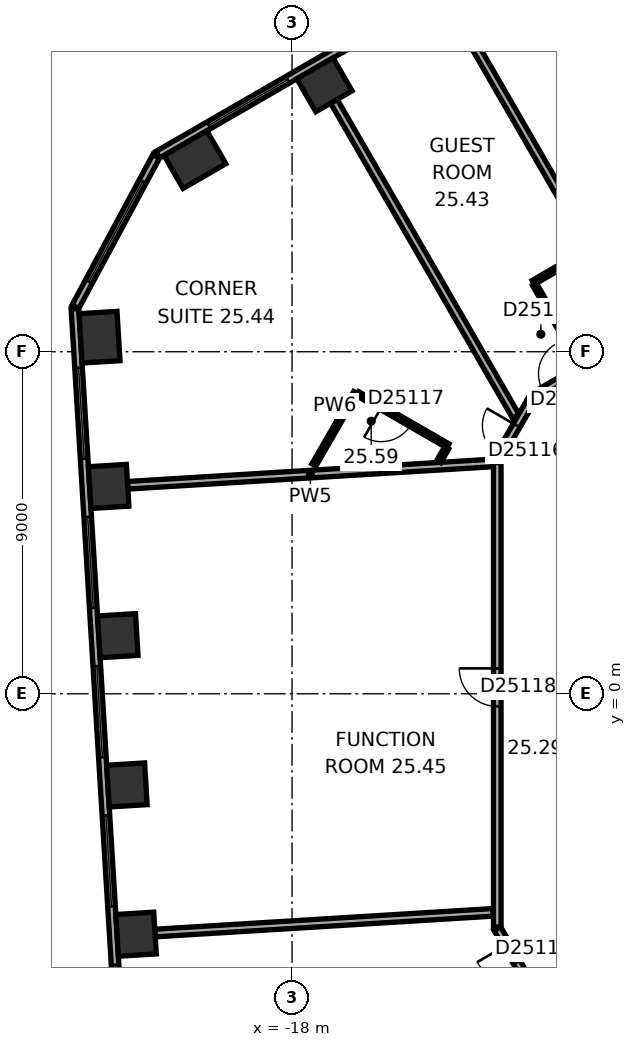
"""IFC4 building model, lengths in metres.
Left out: names, types, materials, properties, quantities, classifications, styles, units other than length and angle.
Written with IfcOpenShell. Run it as: python <this file> out.ifc"""

import sys

from ifc_helpers import new_model, si_unit, direction, frame, frame_2d, origin, origin_2d, place, context, subcontext, project, spatial, rectangle, extrude, element, fill, save


model = new_model("IFC4")
c1 = context("Model", 3, precision=1e-05, world=origin(), true_north=direction((0.0, 1.0)))
c2 = subcontext(c1, "Body", "Model", "MODEL_VIEW")
j1 = project(units=[si_unit("LENGTHUNIT", "METRE"), si_unit("PLANEANGLEUNIT", "RADIAN")], contexts=[c1])
p1 = place(None, origin())
s1 = spatial("IfcSite", under=j1, at=p1, CompositionType="ELEMENT")
p2 = place(p1, origin())
s2 = spatial("IfcBuilding", under=s1, at=p2, CompositionType="ELEMENT")
p3 = place(p2, frame((0.0, 0.0, 106.7)))
s3 = spatial("IfcBuildingStorey", under=s2, at=p3, CompositionType="ELEMENT", Elevation=106.7)
p4 = place(p3, frame((-17.148, 16.023, 0.0), z_axis=(0.0, 0.0, 1.0), x_axis=(-0.866025403784, -0.5, 0.0)))
e1 = element("IfcColumn", 1, at=p4, inside=s3, PredefinedType="COLUMN", context=c2, shape_type="SweptSolid", body=[
    extrude(rectangle(XDim=1.1, YDim=1.0, at=origin_2d()), origin(), (0.0, 0.0, 1.0), 3.3),
])
for number, where, z_axis, x_axis in (
    (2, (-20.555, 14.055, 0.0), (0.0, 0.0, 1.0), (-0.866, -0.5, 0.0)),
    (3, (-23.066, 9.383, 0.0), (0.0, 0.0, 1.0), (0.061, -0.998, 0.0)),
):
    element("IfcColumn", number, at=place(p3, frame(where, z_axis=z_axis, x_axis=x_axis)), inside=s3, PredefinedType="COLUMN", context=c2, shape_type="SweptSolid", body=[
        extrude(rectangle(XDim=1.3, YDim=1.0, at=origin_2d()), origin(), (0.0, 0.0, 1.0), 3.3),
    ])
for number, where, z_axis, x_axis in (
    (4, (-22.826, 5.456, 0.0), (0.0, 0.0, 1.0), (0.061, -0.998, 0.0)),
    (5, (-22.585, 1.529, 0.0), (0.0, 0.0, 1.0), (0.061, -0.998, 0.0)),
    (6, (-22.345, -2.399, 0.0), (0.0, 0.0, 1.0), (0.061, -0.998, 0.0)),
    (7, (-22.105, -6.326, 0.0), (0.0, 0.0, 1.0), (0.061, -0.998, 0.0)),
):
    element("IfcColumn", number, at=place(p3, frame(where, z_axis=z_axis, x_axis=x_axis)), inside=s3, PredefinedType="COLUMN", context=c2, shape_type="SweptSolid", body=[
        extrude(rectangle(XDim=1.1, YDim=1.0, at=origin_2d()), origin(), (0.0, 0.0, 1.0), 3.3),
    ])
p5 = place(p3, frame((-3.136, 24.805, 0.0), z_axis=(0.0, 0.0, 1.0), x_axis=(-0.866028291626, -0.499994998079, 0.0)))
e8 = element("IfcWall", 8, at=p5, inside=s3, PredefinedType="STANDARD", context=c2, shape_type="SweptSolid", body=[
    extrude(rectangle(XDim=21.246, YDim=0.2, at=frame_2d((10.623, 0.0))), origin(), (0.0, 0.0, 1.0), 3.3),
])
p6 = place(p5, frame((1.555, 0.0, 0.8)))
e9 = element("IfcOpeningElement", 9, at=p6, cuts=e8, PredefinedType="OPENING", context=c2, shape_type="SweptSolid", body=[
    extrude(rectangle(XDim=2.4, YDim=1.7, at=frame_2d((1.2, 0.85))), frame((0.0, 0.11, 0.0), z_axis=(0.0, -1.0, 0.0), x_axis=(1.0, 0.0, 0.0)), (0.0, 0.0, 1.0), 0.22),
])
p7 = place(p5, frame((5.489, 0.0, 0.8)))
e10 = element("IfcOpeningElement", 10, at=p7, cuts=e8, PredefinedType="OPENING", context=c2, shape_type="SweptSolid", body=[
    extrude(rectangle(XDim=2.4, YDim=1.7, at=frame_2d((1.2, 0.85))), frame((0.0, 0.11, 0.0), z_axis=(0.0, -1.0, 0.0), x_axis=(1.0, 0.0, 0.0)), (0.0, 0.0, 1.0), 0.22),
])
p8 = place(p5, frame((9.424, 0.0, 0.8)))
e11 = element("IfcOpeningElement", 11, at=p8, cuts=e8, PredefinedType="OPENING", context=c2, shape_type="SweptSolid", body=[
    extrude(rectangle(XDim=2.4, YDim=1.7, at=frame_2d((1.2, 0.85))), frame((0.0, 0.11, 0.0), z_axis=(0.0, -1.0, 0.0), x_axis=(1.0, 0.0, 0.0)), (0.0, 0.0, 1.0), 0.22),
])
p9 = place(p5, frame((13.358, 0.0, 0.8)))
e12 = element("IfcOpeningElement", 12, at=p9, cuts=e8, PredefinedType="OPENING", context=c2, shape_type="SweptSolid", body=[
    extrude(rectangle(XDim=2.4, YDim=1.7, at=frame_2d((1.2, 0.85))), frame((0.0, 0.11, 0.0), z_axis=(0.0, -1.0, 0.0), x_axis=(1.0, 0.0, 0.0)), (0.0, 0.0, 1.0), 0.22),
])
p10 = place(p5, frame((17.293, 0.0, 0.8)))
e13 = element("IfcOpeningElement", 13, at=p10, cuts=e8, PredefinedType="OPENING", context=c2, shape_type="SweptSolid", body=[
    extrude(rectangle(XDim=2.4, YDim=1.7, at=frame_2d((1.2, 0.85))), frame((0.0, 0.11, 0.0), z_axis=(0.0, -1.0, 0.0), x_axis=(1.0, 0.0, 0.0)), (0.0, 0.0, 1.0), 0.22),
])
p11 = place(p3, frame((-21.574, 14.143, 0.0), z_axis=(0.0, 0.0, 1.0), x_axis=(-0.473292949472, -0.880905093628, 0.0)))
e14 = element("IfcWall", 14, at=p11, inside=s3, PredefinedType="STANDARD", context=c2, shape_type="SweptSolid", body=[
    extrude(rectangle(XDim=4.494, YDim=0.2, at=frame_2d((2.247, 0.0))), origin(), (0.0, 0.0, 1.0), 3.3),
])
p12 = place(p11, frame((0.747, 0.0, 0.8)))
e15 = element("IfcOpeningElement", 15, at=p12, cuts=e14, PredefinedType="OPENING", context=c2, shape_type="SweptSolid", body=[
    extrude(rectangle(XDim=3.0, YDim=1.7, at=frame_2d((1.5, 0.85))), frame((0.0, 0.11, 0.0), z_axis=(0.0, -1.0, 0.0), x_axis=(1.0, 0.0, 0.0)), (0.0, 0.0, 1.0), 0.22),
])
p13 = place(p3, frame((-23.713, 10.131, 0.0), z_axis=(0.0, 0.0, 1.0), x_axis=(0.061040439785, -0.998135293791, 0.0)))
e16 = element("IfcWall", 16, at=p13, inside=s3, PredefinedType="STANDARD", context=c2, shape_type="SweptSolid", body=[
    extrude(rectangle(XDim=21.246, YDim=0.2, at=frame_2d((10.623, 0.0))), origin(), (0.0, 0.0, 1.0), 3.3),
])
p14 = place(p13, frame((1.553, 0.0, 0.8)))
e17 = element("IfcOpeningElement", 17, at=p14, cuts=e16, PredefinedType="OPENING", context=c2, shape_type="SweptSolid", body=[
    extrude(rectangle(XDim=2.4, YDim=1.7, at=frame_2d((1.2, 0.85))), frame((0.0, 0.11, 0.0), z_axis=(0.0, -1.0, 0.0), x_axis=(1.0, 0.0, 0.0)), (0.0, 0.0, 1.0), 0.22),
])
p15 = place(p13, frame((5.488, 0.0, 0.8)))
e18 = element("IfcOpeningElement", 18, at=p15, cuts=e16, PredefinedType="OPENING", context=c2, shape_type="SweptSolid", body=[
    extrude(rectangle(XDim=2.4, YDim=1.7, at=frame_2d((1.2, 0.85))), frame((0.0, 0.11, 0.0), z_axis=(0.0, -1.0, 0.0), x_axis=(1.0, 0.0, 0.0)), (0.0, 0.0, 1.0), 0.22),
])
p16 = place(p13, frame((9.422, 0.0, 0.8)))
e19 = element("IfcOpeningElement", 19, at=p16, cuts=e16, PredefinedType="OPENING", context=c2, shape_type="SweptSolid", body=[
    extrude(rectangle(XDim=2.4, YDim=1.7, at=frame_2d((1.2, 0.85))), frame((0.0, 0.11, 0.0), z_axis=(0.0, -1.0, 0.0), x_axis=(1.0, 0.0, 0.0)), (0.0, 0.0, 1.0), 0.22),
])
p17 = place(p13, frame((13.357, 0.0, 0.8)))
e20 = element("IfcOpeningElement", 20, at=p17, cuts=e16, PredefinedType="OPENING", context=c2, shape_type="SweptSolid", body=[
    extrude(rectangle(XDim=2.4, YDim=1.7, at=frame_2d((1.2, 0.85))), frame((0.0, 0.11, 0.0), z_axis=(0.0, -1.0, 0.0), x_axis=(1.0, 0.0, 0.0)), (0.0, 0.0, 1.0), 0.22),
])
p18 = place(p13, frame((17.292, 0.0, 0.8)))
e21 = element("IfcOpeningElement", 21, at=p18, cuts=e16, PredefinedType="OPENING", context=c2, shape_type="SweptSolid", body=[
    extrude(rectangle(XDim=2.4, YDim=1.7, at=frame_2d((1.2, 0.85))), frame((0.0, 0.11, 0.0), z_axis=(0.0, -1.0, 0.0), x_axis=(1.0, 0.0, 0.0)), (0.0, 0.0, 1.0), 0.22),
])
p19 = place(p3, frame((-22.327, 5.486, 0.0), z_axis=(0.0, 0.0, 1.0), x_axis=(0.998135194863, 0.061042057435, 0.0)))
e22 = element("IfcWall", 22, at=p19, inside=s3, PredefinedType="PARTITIONING", context=c2, shape_type="SweptSolid", body=[
    extrude(rectangle(XDim=9.635, YDim=0.2, at=frame_2d((4.817, 0.0))), origin(), (0.0, 0.0, 1.0), 3.05),
])
p20 = place(p3, frame((-21.606, -6.295, 0.0), z_axis=(0.0, 0.0, 1.0), x_axis=(0.998134305525, 0.061056597794, 0.0)))
e23 = element("IfcWall", 23, at=p20, inside=s3, PredefinedType="PARTITIONING", context=c2, shape_type="SweptSolid", body=[
    extrude(rectangle(XDim=8.913, YDim=0.2, at=frame_2d((4.457, 0.0))), origin(), (0.0, 0.0, 1.0), 2.6),
])
p21 = place(p3, frame((-17.426, 6.019, 0.0), z_axis=(0.0, 0.0, 1.0), x_axis=(0.50002983664, 0.866008176907, 0.0)))
e24 = element("IfcWall", 24, at=p21, inside=s3, PredefinedType="PARTITIONING", context=c2, shape_type="SweptSolid", body=[
    extrude(rectangle(XDim=2.2, YDim=0.12, at=frame_2d((1.1, 0.0))), origin(), (0.0, 0.0, 1.0), 3.05),
])
p22 = place(p3, frame((-16.898, 15.59, 0.0), z_axis=(0.0, 0.0, 1.0), x_axis=(0.500023458698, -0.866011859475, 0.0)))
e25 = element("IfcWall", 25, at=p22, inside=s3, PredefinedType="PARTITIONING", context=c2, shape_type="SweptSolid", body=[
    extrude(rectangle(XDim=9.572, YDim=0.2, at=frame_2d((4.786, 0.0))), origin(), (0.0, 0.0, 1.0), 3.05),
])
p23 = place(p3, frame((-16.274, 7.895, 0.0), z_axis=(0.0, 0.0, 1.0), x_axis=(0.865997131366, -0.500048966069, 0.0)))
e26 = element("IfcWall", 26, at=p23, inside=s3, PredefinedType="PARTITIONING", context=c2, shape_type="SweptSolid", body=[
    extrude(rectangle(XDim=2.74, YDim=0.12, at=frame_2d((1.37, 0.0))), origin(), (0.0, 0.0, 1.0), 3.05),
])
p24 = place(p23, frame((0.72, 0.0, 0.0)))
e27 = element("IfcOpeningElement", 27, at=p24, cuts=e26, PredefinedType="OPENING", context=c2, shape_type="SweptSolid", body=[
    extrude(rectangle(XDim=0.9, YDim=2.1, at=frame_2d((0.45, 1.05))), frame((0.0, 0.07, 0.0), z_axis=(0.0, -1.0, 0.0), x_axis=(1.0, 0.0, 0.0)), (0.0, 0.0, 1.0), 0.14),
])
p25 = place(p3, frame((-13.931, 6.472, 0.0), z_axis=(0.0, 0.0, 1.0), x_axis=(-0.499739399214, -0.866175809448, 0.0)))
e28 = element("IfcWall", 28, at=p25, inside=s3, PredefinedType="PARTITIONING", context=c2, shape_type="SweptSolid", body=[
    extrude(rectangle(XDim=0.416, YDim=0.12, at=frame_2d((0.208, 0.0))), origin(), (0.0, 0.0, 1.0), 3.05),
])
p26 = place(p3, frame((-12.6, -6.177, 0.0), z_axis=(0.0, 0.0, 1.0), x_axis=(0.500063520245, -0.865988727248, 0.0)))
e29 = element("IfcWall", 29, at=p26, inside=s3, PredefinedType="PARTITIONING", context=c2, shape_type="SweptSolid", body=[
    extrude(rectangle(XDim=1.9, YDim=0.2, at=frame_2d((0.95, 0.0))), origin(), (0.0, 0.0, 1.0), 3.05),
])
p27 = place(p26, frame((0.5, 0.0, 0.0)))
e30 = element("IfcOpeningElement", 30, at=p27, cuts=e29, PredefinedType="OPENING", context=c2, shape_type="SweptSolid", body=[
    extrude(rectangle(XDim=0.9, YDim=2.1, at=frame_2d((0.45, 1.05))), frame((0.0, 0.11, 0.0), z_axis=(0.0, -1.0, 0.0), x_axis=(1.0, 0.0, 0.0)), (0.0, 0.0, 1.0), 0.22),
])
p28 = place(p3, frame((-12.6, 6.081, 0.0), z_axis=(0.0, 0.0, 1.0), x_axis=(0.0, -1.0, 0.0)))
e31 = element("IfcWall", 31, at=p28, inside=s3, PredefinedType="PARTITIONING", context=c2, shape_type="SweptSolid", body=[
    extrude(rectangle(XDim=12.219, YDim=0.2, at=frame_2d((6.109, 0.0))), origin(), (0.0, 0.0, 1.0), 3.05),
])
p29 = place(p28, frame((5.413, 0.0, 0.0)))
e32 = element("IfcOpeningElement", 32, at=p29, cuts=e31, PredefinedType="OPENING", context=c2, shape_type="SweptSolid", body=[
    extrude(rectangle(XDim=1.0, YDim=2.1, at=frame_2d((0.5, 1.05))), frame((0.0, 0.11, 0.0), z_axis=(0.0, -1.0, 0.0), x_axis=(1.0, 0.0, 0.0)), (0.0, 0.0, 1.0), 0.22),
])
p30 = place(p3, frame((-11.65, 7.823, 0.0), z_axis=(0.0, 0.0, 1.0), x_axis=(-0.500063520245, -0.865988727248, 0.0)))
e33 = element("IfcWall", 33, at=p30, inside=s3, PredefinedType="PARTITIONING", context=c2, shape_type="SweptSolid", body=[
    extrude(rectangle(XDim=1.9, YDim=0.2, at=frame_2d((0.95, 0.0))), origin(), (0.0, 0.0, 1.0), 3.05),
])
p31 = place(p30, frame((0.882, 0.0, 0.0)))
e34 = element("IfcOpeningElement", 34, at=p31, cuts=e33, PredefinedType="OPENING", context=c2, shape_type="SweptSolid", body=[
    extrude(rectangle(XDim=0.9, YDim=2.1, at=frame_2d((0.45, 1.05))), frame((0.0, 0.11, 0.0), z_axis=(0.0, -1.0, 0.0), x_axis=(1.0, 0.0, 0.0)), (0.0, 0.0, 1.0), 0.22),
])
p32 = place(p3, frame((-11.651, 10.825, 0.0), z_axis=(0.0, 0.0, 1.0), x_axis=(0.865998477143, 0.500046635412, 0.0)))
e35 = element("IfcWall", 35, at=p32, inside=s3, PredefinedType="PARTITIONING", context=c2, shape_type="SweptSolid", body=[
    extrude(rectangle(XDim=1.673, YDim=0.12, at=frame_2d((0.836, 0.0))), origin(), (0.0, 0.0, 1.0), 3.05),
])
p33 = place(p3, frame((-10.401, 8.66, 0.0), z_axis=(0.0, 0.0, 1.0), x_axis=(-0.500077547548, 0.865980627057, 0.0)))
e36 = element("IfcWall", 36, at=p33, inside=s3, PredefinedType="PARTITIONING", context=c2, shape_type="SweptSolid", body=[
    extrude(rectangle(XDim=2.44, YDim=0.12, at=frame_2d((1.22, 0.0))), origin(), (0.0, 0.0, 1.0), 3.05),
])
p34 = place(p33, frame((0.77, 0.0, 0.0)))
e37 = element("IfcOpeningElement", 37, at=p34, cuts=e36, PredefinedType="OPENING", context=c2, shape_type="SweptSolid", body=[
    extrude(rectangle(XDim=0.9, YDim=2.1, at=frame_2d((0.45, 1.05))), frame((0.0, 0.07, 0.0), z_axis=(0.0, -1.0, 0.0), x_axis=(1.0, 0.0, 0.0)), (0.0, 0.0, 1.0), 0.14),
])
p35 = place(p3, frame((-8.902, 9.41, 0.0), z_axis=(0.0, 0.0, 1.0), x_axis=(-0.866014299198, -0.500019233215, 0.0)))
e38 = element("IfcWall", 38, at=p35, inside=s3, PredefinedType="PARTITIONING", context=c2, shape_type="SweptSolid", body=[
    extrude(rectangle(XDim=3.133, YDim=0.2, at=frame_2d((1.567, 0.0))), origin(), (0.0, 0.0, 1.0), 3.05),
])
p36 = place(p35, frame((1.978, 0.0, 0.0)))
e39 = element("IfcOpeningElement", 39, at=p36, cuts=e38, PredefinedType="OPENING", context=c2, shape_type="SweptSolid", body=[
    extrude(rectangle(XDim=0.9, YDim=2.1, at=frame_2d((0.45, 1.05))), frame((0.0, 0.11, 0.0), z_axis=(0.0, -1.0, 0.0), x_axis=(1.0, 0.0, 0.0)), (0.0, 0.0, 1.0), 0.22),
])
p37 = place(p3, frame((-7.865, 7.814, 0.0), z_axis=(0.0, 0.0, 1.0), x_axis=(-0.500004234368, 0.866022959057, 0.0)))
e40 = element("IfcWall", 40, at=p37, inside=s3, PredefinedType="PARTITIONING", context=c2, shape_type="SweptSolid", body=[
    extrude(rectangle(XDim=11.25, YDim=0.2, at=frame_2d((5.625, 0.0))), origin(), (0.0, 0.0, 1.0), 3.05),
])
p38 = place(p37, frame((0.5, 0.0, 0.0)))
e41 = element("IfcOpeningElement", 41, at=p38, cuts=e40, PredefinedType="OPENING", context=c2, shape_type="SweptSolid", body=[
    extrude(rectangle(XDim=0.9, YDim=2.1, at=frame_2d((0.45, 1.05))), frame((0.0, 0.11, 0.0), z_axis=(0.0, -1.0, 0.0), x_axis=(1.0, 0.0, 0.0)), (0.0, 0.0, 1.0), 0.22),
])
p39 = place(p10, origin())
e42 = element("IfcWindow", 42, at=p39, inside=s3, PartitioningType="SINGLE_PANEL", PredefinedType="WINDOW", context=c2, shape_type="SweptSolid", body=[
    extrude(rectangle(XDim=2.4, YDim=1.7, at=frame_2d((1.2, 0.85))), frame((0.0, 0.03, 0.0), z_axis=(0.0, -1.0, 0.0), x_axis=(1.0, 0.0, 0.0)), (0.0, 0.0, 1.0), 0.06),
])
fill(e13, e42)
p40 = place(p12, origin())
e43 = element("IfcWindow", 43, at=p40, inside=s3, PartitioningType="SINGLE_PANEL", PredefinedType="WINDOW", context=c2, shape_type="SweptSolid", body=[
    extrude(rectangle(XDim=3.0, YDim=1.7, at=frame_2d((1.5, 0.85))), frame((0.0, 0.03, 0.0), z_axis=(0.0, -1.0, 0.0), x_axis=(1.0, 0.0, 0.0)), (0.0, 0.0, 1.0), 0.06),
])
fill(e15, e43)
p41 = place(p14, origin())
e44 = element("IfcWindow", 44, at=p41, inside=s3, PartitioningType="SINGLE_PANEL", PredefinedType="WINDOW", context=c2, shape_type="SweptSolid", body=[
    extrude(rectangle(XDim=2.4, YDim=1.7, at=frame_2d((1.2, 0.85))), frame((0.0, 0.03, 0.0), z_axis=(0.0, -1.0, 0.0), x_axis=(1.0, 0.0, 0.0)), (0.0, 0.0, 1.0), 0.06),
])
fill(e17, e44)
p42 = place(p15, origin())
e45 = element("IfcWindow", 45, at=p42, inside=s3, PartitioningType="SINGLE_PANEL", PredefinedType="WINDOW", context=c2, shape_type="SweptSolid", body=[
    extrude(rectangle(XDim=2.4, YDim=1.7, at=frame_2d((1.2, 0.85))), frame((0.0, 0.03, 0.0), z_axis=(0.0, -1.0, 0.0), x_axis=(1.0, 0.0, 0.0)), (0.0, 0.0, 1.0), 0.06),
])
fill(e18, e45)
p43 = place(p16, origin())
e46 = element("IfcWindow", 46, at=p43, inside=s3, PartitioningType="SINGLE_PANEL", PredefinedType="WINDOW", context=c2, shape_type="SweptSolid", body=[
    extrude(rectangle(XDim=2.4, YDim=1.7, at=frame_2d((1.2, 0.85))), frame((0.0, 0.03, 0.0), z_axis=(0.0, -1.0, 0.0), x_axis=(1.0, 0.0, 0.0)), (0.0, 0.0, 1.0), 0.06),
])
fill(e19, e46)
p44 = place(p17, origin())
e47 = element("IfcWindow", 47, at=p44, inside=s3, PartitioningType="SINGLE_PANEL", PredefinedType="WINDOW", context=c2, shape_type="SweptSolid", body=[
    extrude(rectangle(XDim=2.4, YDim=1.7, at=frame_2d((1.2, 0.85))), frame((0.0, 0.03, 0.0), z_axis=(0.0, -1.0, 0.0), x_axis=(1.0, 0.0, 0.0)), (0.0, 0.0, 1.0), 0.06),
])
fill(e20, e47)
p45 = place(p18, origin())
e48 = element("IfcWindow", 48, at=p45, inside=s3, PartitioningType="SINGLE_PANEL", PredefinedType="WINDOW", context=c2, shape_type="SweptSolid", body=[
    extrude(rectangle(XDim=2.4, YDim=1.7, at=frame_2d((1.2, 0.85))), frame((0.0, 0.03, 0.0), z_axis=(0.0, -1.0, 0.0), x_axis=(1.0, 0.0, 0.0)), (0.0, 0.0, 1.0), 0.06),
])
fill(e21, e48)
p46 = place(p36, origin())
e49 = element("IfcDoor", 49, at=p46, inside=s3, OperationType="SINGLE_SWING_LEFT", PredefinedType="DOOR", context=c2, shape_type="SweptSolid", body=[
    extrude(rectangle(XDim=0.9, YDim=2.1, at=frame_2d((0.45, 1.05))), frame((0.0, 0.025, 0.0), z_axis=(0.0, -1.0, 0.0), x_axis=(1.0, 0.0, 0.0)), (0.0, 0.0, 1.0), 0.05),
])
fill(e39, e49)
p47 = place(p34, origin())
e50 = element("IfcDoor", 50, at=p47, inside=s3, OperationType="SINGLE_SWING_LEFT", PredefinedType="DOOR", context=c2, shape_type="SweptSolid", body=[
    extrude(rectangle(XDim=0.9, YDim=2.1, at=frame_2d((0.45, 1.05))), frame((0.0, 0.025, 0.0), z_axis=(0.0, -1.0, 0.0), x_axis=(1.0, 0.0, 0.0)), (0.0, 0.0, 1.0), 0.05),
])
fill(e37, e50)
p48 = place(p31, origin())
e51 = element("IfcDoor", 51, at=p48, inside=s3, OperationType="SINGLE_SWING_LEFT", PredefinedType="DOOR", context=c2, shape_type="SweptSolid", body=[
    extrude(rectangle(XDim=0.9, YDim=2.1, at=frame_2d((0.45, 1.05))), frame((0.0, 0.025, 0.0), z_axis=(0.0, -1.0, 0.0), x_axis=(1.0, 0.0, 0.0)), (0.0, 0.0, 1.0), 0.05),
])
fill(e34, e51)
p49 = place(p24, origin())
e52 = element("IfcDoor", 52, at=p49, inside=s3, OperationType="SINGLE_SWING_LEFT", PredefinedType="DOOR", context=c2, shape_type="SweptSolid", body=[
    extrude(rectangle(XDim=0.9, YDim=2.1, at=frame_2d((0.45, 1.05))), frame((0.0, 0.025, 0.0), z_axis=(0.0, -1.0, 0.0), x_axis=(1.0, 0.0, 0.0)), (0.0, 0.0, 1.0), 0.05),
])
fill(e27, e52)
p50 = place(p29, origin())
e53 = element("IfcDoor", 53, at=p50, inside=s3, OperationType="SINGLE_SWING_LEFT", PredefinedType="DOOR", context=c2, shape_type="SweptSolid", body=[
    extrude(rectangle(XDim=1.0, YDim=2.1, at=frame_2d((0.5, 1.05))), frame((0.0, 0.025, 0.0), z_axis=(0.0, -1.0, 0.0), x_axis=(1.0, 0.0, 0.0)), (0.0, 0.0, 1.0), 0.05),
])
fill(e32, e53)
p51 = place(p27, origin())
e54 = element("IfcDoor", 54, at=p51, inside=s3, OperationType="SINGLE_SWING_LEFT", PredefinedType="DOOR", context=c2, shape_type="SweptSolid", body=[
    extrude(rectangle(XDim=0.9, YDim=2.1, at=frame_2d((0.45, 1.05))), frame((0.0, 0.025, 0.0), z_axis=(0.0, -1.0, 0.0), x_axis=(1.0, 0.0, 0.0)), (0.0, 0.0, 1.0), 0.05),
])
fill(e30, e54)
save(model, sys.argv[1])
